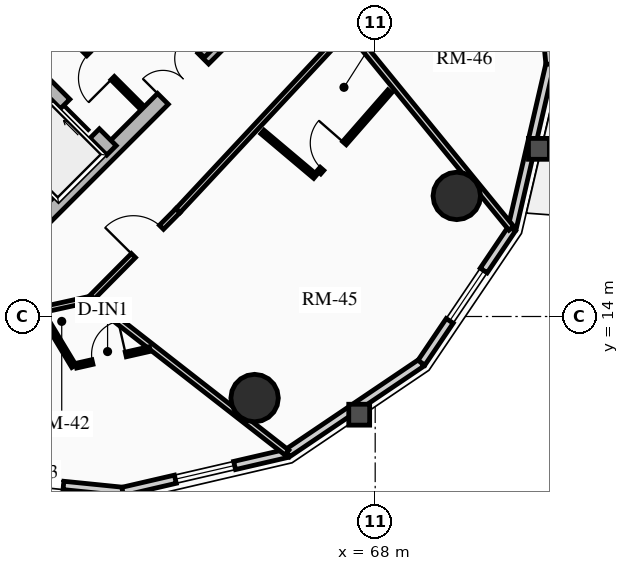
"""IFC4 building model, lengths in metres.
Left out: names, types, materials, properties, quantities, classifications, styles, units other than length and angle.
Written with IfcOpenShell. Run it as: python <this file> out.ifc"""

import sys

from ifc_helpers import new_model, si_unit, direction, frame, frame_2d, origin, origin_2d, place, context, subcontext, project, spatial, rectangle, circle, extrude, source, transform, mapped, element, fill, save


model = new_model("IFC4")
c1 = context("Model", 3, precision=1e-05, world=origin(), true_north=direction((0.0, 1.0)))
c2 = subcontext(c1, "Body", "Model", "MODEL_VIEW")
j1 = project(units=[si_unit("LENGTHUNIT", "METRE"), si_unit("PLANEANGLEUNIT", "RADIAN")], contexts=[c1])
p1 = place(None, origin())
s1 = spatial("IfcSite", under=j1, at=p1, CompositionType="ELEMENT")
p2 = place(p1, origin())
s2 = spatial("IfcBuilding", under=s1, at=p2, CompositionType="ELEMENT")
p3 = place(p2, frame((0.0, 0.0, 180.7)))
s3 = spatial("IfcBuildingStorey", under=s2, at=p3, CompositionType="ELEMENT", Elevation=180.7)
p4 = place(p3, frame((58.561, 15.873, 0.0), z_axis=(0.0, 0.0, 1.0), x_axis=(0.707106781187, 0.707106781187, 0.0)))
e1 = element("IfcWall", 1, at=p4, inside=s3, PredefinedType="SHEAR", context=c2, shape_type="SweptSolid", body=[
    extrude(rectangle(XDim=10.7, YDim=0.4, at=frame_2d((5.35, 0.0))), origin(), (0.0, 0.0, 1.0), 2.91),
])
m1 = source(origin(), c2, "Body", "SweptSolid", [
    extrude(rectangle(XDim=1.5, YDim=2.02, at=frame_2d((0.75, 1.01))), frame((0.0, 0.21, 0.0), z_axis=(0.0, -1.0, 0.0), x_axis=(1.0, 0.0, 0.0)), (0.0, 0.0, 1.0), 0.42),
])
p5 = place(p4, frame((5.45, 0.0, 0.0)))
e2 = element("IfcOpeningElement", 2, at=p5, cuts=e1, PredefinedType="OPENING", context=c2, shape_type="MappedRepresentation", body=[
    mapped(m1, transform((0.0, 0.0, 0.0), x_axis=(1.0, 0.0, 0.0), y_axis=(0.0, 1.0, 0.0), z_axis=(0.0, 0.0, 1.0), scale=1.0)),
])
p6 = place(p3, frame((61.06, 18.373, 0.0), z_axis=(0.0, 0.0, 1.0), x_axis=(-0.707106781187, 0.707106781187, 0.0)))
e3 = element("IfcWall", 3, at=p6, inside=s3, PredefinedType="SHEAR", context=c2, shape_type="SweptSolid", body=[
    extrude(rectangle(XDim=13.7, YDim=0.35, at=frame_2d((6.85, 0.0))), origin(), (0.0, 0.0, 1.0), 2.91),
])
m2 = source(origin(), c2, "Body", "SweptSolid", [
    extrude(rectangle(XDim=1.1, YDim=2.015, at=frame_2d((0.55, 1.007))), frame((0.0, 0.185, 0.0), z_axis=(0.0, -1.0, 0.0), x_axis=(1.0, 0.0, 0.0)), (0.0, 0.0, 1.0), 0.37),
])
p7 = place(p6, frame((4.85, 0.0, 0.0)))
e4 = element("IfcOpeningElement", 4, at=p7, cuts=e3, PredefinedType="OPENING", context=c2, shape_type="MappedRepresentation", body=[
    mapped(m2, transform((0.0, 0.0, 0.0), x_axis=(1.0, 0.0, 0.0), y_axis=(0.0, 1.0, 0.0), z_axis=(0.0, 0.0, 1.0), scale=1.0)),
])
p8 = place(p6, frame((0.625, 0.0, 0.0)))
e5 = element("IfcOpeningElement", 5, at=p8, cuts=e3, PredefinedType="OPENING", context=c2, shape_type="MappedRepresentation", body=[
    mapped(m2, transform((0.0, 0.0, 0.0), x_axis=(1.0, 0.0, 0.0), y_axis=(0.0, 1.0, 0.0), z_axis=(0.0, 0.0, 1.0), scale=1.0)),
])
p9 = place(p6, frame((2.625, 0.0, 0.0)))
e6 = element("IfcOpeningElement", 6, at=p9, cuts=e3, PredefinedType="OPENING", context=c2, shape_type="MappedRepresentation", body=[
    mapped(m2, transform((0.0, 0.0, 0.0), x_axis=(1.0, 0.0, 0.0), y_axis=(0.0, 1.0, 0.0), z_axis=(0.0, 0.0, 1.0), scale=1.0)),
])
m3 = source(origin(), c2, "Body", "SweptSolid", [
    extrude(rectangle(XDim=1.15, YDim=2.02, at=frame_2d((0.575, 1.01))), frame((0.0, 0.185, 0.0), z_axis=(0.0, -1.0, 0.0), x_axis=(1.0, 0.0, 0.0)), (0.0, 0.0, 1.0), 0.37),
])
p10 = place(p6, frame((7.27, 0.0, 0.0)))
e7 = element("IfcOpeningElement", 7, at=p10, cuts=e3, PredefinedType="OPENING", context=c2, shape_type="MappedRepresentation", body=[
    mapped(m3, transform((0.0, 0.0, 0.0), x_axis=(1.0, 0.0, 0.0), y_axis=(0.0, 1.0, 0.0), z_axis=(0.0, 0.0, 1.0), scale=1.0)),
])
p11 = place(p3, frame((63.627, 20.94, 0.0), z_axis=(0.0, 0.0, 1.0), x_axis=(-0.707119496762, 0.707094065383, 0.0)))
e8 = element("IfcWall", 8, at=p11, inside=s3, PredefinedType="SHEAR", context=c2, shape_type="SweptSolid", body=[
    extrude(rectangle(XDim=9.6, YDim=0.35, at=frame_2d((4.8, 0.0))), origin(), (0.0, 0.0, 1.0), 2.91),
])
p12 = place(p11, frame((5.28, 0.0, 0.0)))
e9 = element("IfcOpeningElement", 9, at=p12, cuts=e8, PredefinedType="OPENING", context=c2, shape_type="MappedRepresentation", body=[
    mapped(m3, transform((0.0, 0.0, 0.0), x_axis=(1.0, 0.0, 0.0), y_axis=(0.0, 1.0, 0.0), z_axis=(0.0, 0.0, 1.0), scale=1.0)),
])
for number, where, z_axis, x_axis in (
    (10, (64.827, 11.854, 0.0), (0.0, 0.0, 1.0), (1.0, 0.0, 0.0)),
    (11, (70.146, 17.173, 0.0), (0.0, 0.0, 1.0), (1.0, 0.0, 0.0)),
):
    element("IfcColumn", number, at=place(p3, frame(where, z_axis=z_axis, x_axis=x_axis)), inside=s3, PredefinedType="USERDEFINED", context=c2, shape_type="SweptSolid", body=[
        extrude(circle(Radius=0.625, at=origin_2d()), origin(), (0.0, 0.0, 1.0), 2.91),
    ])
p13 = place(p3, frame((61.355, 9.397, 0.0), z_axis=(0.0, 0.0, 1.0), x_axis=(-0.994943283129, 0.100438356004, 0.0)))
e12 = element("IfcWall", 12, at=p13, inside=s3, PredefinedType="SOLIDWALL", context=c2, shape_type="SweptSolid", body=[
    extrude(rectangle(XDim=4.733, YDim=0.22, at=frame_2d((2.366, 0.0))), origin(), (0.0, 0.0, 1.0), 2.245),
])
m4 = source(origin(), c2, "Body", "SweptSolid", [
    extrude(rectangle(XDim=1.6, YDim=1.3, at=frame_2d((0.8, 0.65))), frame((0.0, 0.12, 0.0), z_axis=(0.0, -1.0, 0.0), x_axis=(1.0, 0.0, 0.0)), (0.0, 0.0, 1.0), 0.24),
])
p14 = place(p13, frame((1.566, 0.0, 0.65)))
e13 = element("IfcOpeningElement", 13, at=p14, cuts=e12, PredefinedType="OPENING", context=c2, shape_type="MappedRepresentation", body=[
    mapped(m4, transform((0.0, 0.0, 0.0), x_axis=(1.0, 0.0, 0.0), y_axis=(0.0, 1.0, 0.0), z_axis=(0.0, 0.0, 1.0), scale=1.0)),
])
p15 = place(p3, frame((65.687, 10.4, 0.0), z_axis=(0.0, 0.0, 1.0), x_axis=(-0.97422620202, -0.22557328587, 0.0)))
e14 = element("IfcWall", 14, at=p15, inside=s3, PredefinedType="SOLIDWALL", context=c2, shape_type="SweptSolid", body=[
    extrude(rectangle(XDim=4.446, YDim=0.22, at=frame_2d((2.223, 0.0))), origin(), (0.0, 0.0, 1.0), 2.245),
])
p16 = place(p15, frame((1.423, 0.0, 0.65)))
e15 = element("IfcOpeningElement", 15, at=p16, cuts=e14, PredefinedType="OPENING", context=c2, shape_type="MappedRepresentation", body=[
    mapped(m4, transform((0.0, 0.0, 0.0), x_axis=(1.0, 0.0, 0.0), y_axis=(0.0, 1.0, 0.0), z_axis=(0.0, 0.0, 1.0), scale=1.0)),
])
p17 = place(p3, frame((69.217, 12.783, 0.0), z_axis=(0.0, 0.0, 1.0), x_axis=(-0.828817439852, -0.55951912514, 0.0)))
e16 = element("IfcWall", 16, at=p17, inside=s3, PredefinedType="SOLIDWALL", context=c2, shape_type="SweptSolid", body=[
    extrude(rectangle(XDim=4.259, YDim=0.22, at=frame_2d((2.129, 0.0))), origin(), (0.0, 0.0, 1.0), 2.245),
])
p18 = place(p3, frame((71.6, 16.313, 0.0), z_axis=(0.0, 0.0, 1.0), x_axis=(-0.55951912514, -0.828817439852, 0.0)))
e17 = element("IfcWall", 17, at=p18, inside=s3, PredefinedType="SOLIDWALL", context=c2, shape_type="SweptSolid", body=[
    extrude(rectangle(XDim=4.259, YDim=0.22, at=frame_2d((2.129, 0.0))), origin(), (0.0, 0.0, 1.0), 2.245),
])
p19 = place(p18, frame((1.33, 0.0, 0.65)))
e18 = element("IfcOpeningElement", 18, at=p19, cuts=e17, PredefinedType="OPENING", context=c2, shape_type="MappedRepresentation", body=[
    mapped(m4, transform((0.0, 0.0, 0.0), x_axis=(1.0, 0.0, 0.0), y_axis=(0.0, 1.0, 0.0), z_axis=(0.0, 0.0, 1.0), scale=1.0)),
])
p20 = place(p3, frame((72.603, 20.645, 0.0), z_axis=(0.0, 0.0, 1.0), x_axis=(-0.22557328587, -0.97422620202, 0.0)))
e19 = element("IfcWall", 19, at=p20, inside=s3, PredefinedType="SOLIDWALL", context=c2, shape_type="SweptSolid", body=[
    extrude(rectangle(XDim=4.446, YDim=0.22, at=frame_2d((2.223, 0.0))), origin(), (0.0, 0.0, 1.0), 2.245),
])
p21 = place(p3, frame((72.127, 25.354, 0.0), z_axis=(0.0, 0.0, 1.0), x_axis=(0.100438356004, -0.994943283129, 0.0)))
e20 = element("IfcWall", 20, at=p21, inside=s3, PredefinedType="SOLIDWALL", context=c2, shape_type="SweptSolid", body=[
    extrude(rectangle(XDim=4.733, YDim=0.22, at=frame_2d((2.366, 0.0))), origin(), (0.0, 0.0, 1.0), 2.245),
])
p22 = place(p21, frame((1.566, 0.0, 0.65)))
e21 = element("IfcOpeningElement", 21, at=p22, cuts=e20, PredefinedType="OPENING", context=c2, shape_type="MappedRepresentation", body=[
    mapped(m4, transform((0.0, 0.0, 0.0), x_axis=(1.0, 0.0, 0.0), y_axis=(0.0, 1.0, 0.0), z_axis=(0.0, 0.0, 1.0), scale=1.0)),
])
p23 = place(p3, frame((61.835, 19.529, 0.0), z_axis=(0.0, 0.0, 1.0), x_axis=(-0.707146413884, 0.707067146267, 0.0)))
e22 = element("IfcWall", 22, at=p23, inside=s3, PredefinedType="PARTITIONING", context=c2, shape_type="SweptSolid", body=[
    extrude(rectangle(XDim=3.08, YDim=0.125, at=frame_2d((1.54, 0.0))), origin(), (0.0, 0.0, 1.0), 2.675),
])
m5 = source(origin(), c2, "Body", "SweptSolid", [
    extrude(rectangle(XDim=0.9, YDim=2.005, at=frame_2d((0.45, 1.002))), frame((0.0, 0.073, 0.0), z_axis=(0.0, -1.0, 0.0), x_axis=(1.0, 0.0, 0.0)), (0.0, 0.0, 1.0), 0.145),
])
p24 = place(p23, frame((1.05, 0.0, 0.0)))
e23 = element("IfcOpeningElement", 23, at=p24, cuts=e22, PredefinedType="OPENING", context=c2, shape_type="MappedRepresentation", body=[
    mapped(m5, transform((0.0, 0.0, 0.0), x_axis=(1.0, 0.0, 0.0), y_axis=(0.0, 1.0, 0.0), z_axis=(0.0, 0.0, 1.0), scale=1.0)),
])
p25 = place(p3, frame((58.794, 20.915, 0.0), z_axis=(0.0, 0.0, 1.0), x_axis=(0.707106781187, 0.707106781187, 0.0)))
e24 = element("IfcWall", 24, at=p25, inside=s3, PredefinedType="PARTITIONING", context=c2, shape_type="SweptSolid", body=[
    extrude(rectangle(XDim=1.1, YDim=0.125, at=frame_2d((0.55, 0.0))), origin(), (0.0, 0.0, 1.0), 2.675),
])
p26 = place(p3, frame((58.967, 14.118, 0.0), z_axis=(0.0, 0.0, 1.0), x_axis=(0.976471358036, 0.215647135235, 0.0)))
e25 = element("IfcWall", 25, at=p26, inside=s3, PredefinedType="PARTITIONING", context=c2, shape_type="SweptSolid", body=[
    extrude(rectangle(XDim=1.571, YDim=0.15, at=frame_2d((0.786, 0.0))), origin(), (0.0, 0.0, 1.0), 2.245),
])
p27 = place(p3, frame((60.501, 14.457, 0.0), z_axis=(0.0, 0.0, 1.0), x_axis=(0.704012266258, 0.710187812454, 0.0)))
e26 = element("IfcWall", 26, at=p27, inside=s3, PredefinedType="PARTITIONING", context=c2, shape_type="SweptSolid", body=[
    extrude(rectangle(XDim=3.281, YDim=0.15, at=frame_2d((1.641, 0.0))), origin(), (0.0, 0.0, 1.0), 2.245),
])
m6 = source(origin(), c2, "Body", "SweptSolid", [
    extrude(rectangle(XDim=1.05, YDim=2.015, at=frame_2d((0.525, 1.007))), frame((0.0, 0.085, 0.0), z_axis=(0.0, -1.0, 0.0), x_axis=(1.0, 0.0, 0.0)), (0.0, 0.0, 1.0), 0.17),
])
p28 = place(p27, frame((1.614, 0.0, 0.0)))
e27 = element("IfcOpeningElement", 27, at=p28, cuts=e26, PredefinedType="OPENING", context=c2, shape_type="MappedRepresentation", body=[
    mapped(m6, transform((0.0, 0.0, 0.0), x_axis=(1.0, 0.0, 0.0), y_axis=(0.0, 1.0, 0.0), z_axis=(0.0, 0.0, 1.0), scale=1.0)),
])
p29 = place(p3, frame((62.812, 16.788, 0.0), z_axis=(0.0, 0.0, 1.0), x_axis=(0.682323555485, 0.731050316757, 0.0)))
e28 = element("IfcWall", 28, at=p29, inside=s3, PredefinedType="PARTITIONING", context=c2, shape_type="SweptSolid", body=[
    extrude(rectangle(XDim=6.559, YDim=0.15, at=frame_2d((3.279, 0.0))), origin(), (0.0, 0.0, 1.0), 2.245),
])
p30 = place(p3, frame((60.501, 14.457, 0.0), z_axis=(0.0, 0.0, 1.0), x_axis=(0.788354052705, -0.61522181982, 0.0)))
e29 = element("IfcWall", 29, at=p30, inside=s3, PredefinedType="PARTITIONING", context=c2, shape_type="SweptSolid", body=[
    extrude(rectangle(XDim=6.566, YDim=0.16, at=frame_2d((3.283, 0.0))), origin(), (0.0, 0.0, 1.0), 2.245),
])
p31 = place(p3, frame((67.287, 21.582, 0.0), z_axis=(0.0, 0.0, 1.0), x_axis=(0.632528819581, -0.774536824431, 0.0)))
e30 = element("IfcWall", 30, at=p31, inside=s3, PredefinedType="PARTITIONING", context=c2, shape_type="SweptSolid", body=[
    extrude(rectangle(XDim=6.791, YDim=0.16, at=frame_2d((3.396, 0.0))), origin(), (0.0, 0.0, 1.0), 2.245),
])
p32 = place(p3, frame((59.265, 14.028, 0.0), z_axis=(0.0, 0.0, 1.0), x_axis=(0.515875690436, -0.856663453181, 0.0)))
e31 = element("IfcWall", 31, at=p32, inside=s3, PredefinedType="PARTITIONING", context=c2, shape_type="SweptSolid", body=[
    extrude(rectangle(XDim=1.56, YDim=0.125, at=frame_2d((0.78, 0.0))), origin(), (0.0, 0.0, 1.0), 2.245),
])
p33 = place(p3, frame((60.131, 12.705, 0.0), z_axis=(0.0, 0.0, 1.0), x_axis=(0.975184609806, 0.221393262767, 0.0)))
e32 = element("IfcWall", 32, at=p33, inside=s3, PredefinedType="PARTITIONING", context=c2, shape_type="SweptSolid", body=[
    extrude(rectangle(XDim=1.991, YDim=0.125, at=frame_2d((0.996, 0.0))), origin(), (0.0, 0.0, 1.0), 2.675),
])
p34 = place(p33, frame((0.439, 0.0, 0.0)))
e33 = element("IfcOpeningElement", 33, at=p34, cuts=e32, PredefinedType="OPENING", context=c2, shape_type="MappedRepresentation", body=[
    mapped(m5, transform((0.0, 0.0, 0.0), x_axis=(1.0, 0.0, 0.0), y_axis=(0.0, 1.0, 0.0), z_axis=(0.0, 0.0, 1.0), scale=1.0)),
])
p35 = place(p3, frame((65.033, 18.856, 0.0), z_axis=(0.0, 0.0, 1.0), x_axis=(0.764632588969, -0.644466449, 0.0)))
e34 = element("IfcWall", 34, at=p35, inside=s3, PredefinedType="PARTITIONING", context=c2, shape_type="SweptSolid", body=[
    extrude(rectangle(XDim=1.818, YDim=0.125, at=frame_2d((0.909, 0.0))), origin(), (0.0, 0.0, 1.0), 2.675),
])
p36 = place(p3, frame((66.52, 17.795, 0.0), z_axis=(0.0, 0.0, 1.0), x_axis=(0.658266024679, 0.752785388244, 0.0)))
e35 = element("IfcWall", 35, at=p36, inside=s3, PredefinedType="PARTITIONING", context=c2, shape_type="SweptSolid", body=[
    extrude(rectangle(XDim=2.826, YDim=0.125, at=frame_2d((1.413, 0.0))), origin(), (0.0, 0.0, 1.0), 2.245),
])
p37 = place(p36, frame((0.12, 0.0, 0.0)))
e36 = element("IfcOpeningElement", 36, at=p37, cuts=e35, PredefinedType="OPENING", context=c2, shape_type="MappedRepresentation", body=[
    mapped(m5, transform((0.0, 0.0, 0.0), x_axis=(1.0, 0.0, 0.0), y_axis=(0.0, 1.0, 0.0), z_axis=(0.0, 0.0, 1.0), scale=1.0)),
])
m7 = source(origin(), c2, "Body", "SweptSolid", [
    extrude(rectangle(XDim=1.6, YDim=1.3, at=frame_2d((0.8, 0.65))), frame((0.0, 0.03, 0.0), z_axis=(0.0, -1.0, 0.0), x_axis=(1.0, 0.0, 0.0)), (0.0, 0.0, 1.0), 0.06),
])
p38 = place(p14, origin())
e37 = element("IfcWindow", 37, at=p38, inside=s3, PartitioningType="SINGLE_PANEL", PredefinedType="WINDOW", context=c2, shape_type="MappedRepresentation", body=[
    mapped(m7, transform((0.0, 0.0, 0.0), x_axis=(1.0, 0.0, 0.0), y_axis=(0.0, 1.0, 0.0), z_axis=(0.0, 0.0, 1.0), scale=1.0)),
])
fill(e13, e37)
p39 = place(p16, origin())
e38 = element("IfcWindow", 38, at=p39, inside=s3, PartitioningType="SINGLE_PANEL", PredefinedType="WINDOW", context=c2, shape_type="MappedRepresentation", body=[
    mapped(m7, transform((0.0, 0.0, 0.0), x_axis=(1.0, 0.0, 0.0), y_axis=(0.0, 1.0, 0.0), z_axis=(0.0, 0.0, 1.0), scale=1.0)),
])
fill(e15, e38)
p40 = place(p19, origin())
e39 = element("IfcWindow", 39, at=p40, inside=s3, PartitioningType="SINGLE_PANEL", PredefinedType="WINDOW", context=c2, shape_type="MappedRepresentation", body=[
    mapped(m7, transform((0.0, 0.0, 0.0), x_axis=(1.0, 0.0, 0.0), y_axis=(0.0, 1.0, 0.0), z_axis=(0.0, 0.0, 1.0), scale=1.0)),
])
fill(e18, e39)
m8 = source(origin(), c2, "Body", "SweptSolid", [
    extrude(rectangle(XDim=1.1, YDim=2.015, at=frame_2d((0.55, 1.007))), frame((0.0, 0.025, 0.0), z_axis=(0.0, -1.0, 0.0), x_axis=(1.0, 0.0, 0.0)), (0.0, 0.0, 1.0), 0.05),
])
p41 = place(p8, origin())
e40 = element("IfcDoor", 40, at=p41, inside=s3, OperationType="SLIDING_TO_RIGHT", PredefinedType="DOOR", context=c2, shape_type="MappedRepresentation", body=[
    mapped(m8, transform((0.0, 0.0, 0.0), x_axis=(1.0, 0.0, 0.0), y_axis=(0.0, 1.0, 0.0), z_axis=(0.0, 0.0, 1.0), scale=1.0)),
])
fill(e5, e40)
m9 = source(origin(), c2, "Body", "SweptSolid", [
    extrude(rectangle(XDim=1.5, YDim=2.02, at=frame_2d((0.75, 1.01))), frame((0.0, 0.025, 0.0), z_axis=(0.0, -1.0, 0.0), x_axis=(1.0, 0.0, 0.0)), (0.0, 0.0, 1.0), 0.05),
])
p42 = place(p5, origin())
e41 = element("IfcDoor", 41, at=p42, inside=s3, OperationType="DOUBLE_DOOR_SINGLE_SWING", PredefinedType="DOOR", context=c2, shape_type="MappedRepresentation", body=[
    mapped(m9, transform((0.0, 0.0, 0.0), x_axis=(1.0, 0.0, 0.0), y_axis=(0.0, 1.0, 0.0), z_axis=(0.0, 0.0, 1.0), scale=1.0)),
])
fill(e2, e41)
m10 = source(origin(), c2, "Body", "SweptSolid", [
    extrude(rectangle(XDim=0.9, YDim=2.005, at=frame_2d((0.45, 1.002))), frame((0.0, 0.025, 0.0), z_axis=(0.0, -1.0, 0.0), x_axis=(1.0, 0.0, 0.0)), (0.0, 0.0, 1.0), 0.05),
])
p43 = place(p24, origin())
e42 = element("IfcDoor", 42, at=p43, inside=s3, OperationType="SINGLE_SWING_LEFT", PredefinedType="DOOR", context=c2, shape_type="MappedRepresentation", body=[
    mapped(m10, transform((0.0, 0.0, 0.0), x_axis=(1.0, 0.0, 0.0), y_axis=(0.0, 1.0, 0.0), z_axis=(0.0, 0.0, 1.0), scale=1.0)),
])
fill(e23, e42)
p44 = place(p34, origin())
e43 = element("IfcDoor", 43, at=p44, inside=s3, OperationType="SINGLE_SWING_RIGHT", PredefinedType="DOOR", context=c2, shape_type="MappedRepresentation", body=[
    mapped(m10, transform((0.0, 0.0, 0.0), x_axis=(1.0, 0.0, 0.0), y_axis=(0.0, 1.0, 0.0), z_axis=(0.0, 0.0, 1.0), scale=1.0)),
])
fill(e33, e43)
m11 = source(origin(), c2, "Body", "SweptSolid", [
    extrude(rectangle(XDim=1.05, YDim=2.015, at=frame_2d((0.525, 1.007))), frame((0.0, 0.025, 0.0), z_axis=(0.0, -1.0, 0.0), x_axis=(1.0, 0.0, 0.0)), (0.0, 0.0, 1.0), 0.05),
])
p45 = place(p28, origin())
e44 = element("IfcDoor", 44, at=p45, inside=s3, OperationType="SINGLE_SWING_LEFT", PredefinedType="DOOR", context=c2, shape_type="MappedRepresentation", body=[
    mapped(m11, transform((0.0, 0.0, 0.0), x_axis=(1.0, 0.0, 0.0), y_axis=(0.0, 1.0, 0.0), z_axis=(0.0, 0.0, 1.0), scale=1.0)),
])
fill(e27, e44)
p46 = place(p37, origin())
e45 = element("IfcDoor", 45, at=p46, inside=s3, OperationType="SINGLE_SWING_RIGHT", PredefinedType="DOOR", context=c2, shape_type="MappedRepresentation", body=[
    mapped(m10, transform((0.0, 0.0, 0.0), x_axis=(1.0, 0.0, 0.0), y_axis=(0.0, 1.0, 0.0), z_axis=(0.0, 0.0, 1.0), scale=1.0)),
])
fill(e36, e45)
save(model, sys.argv[1])
